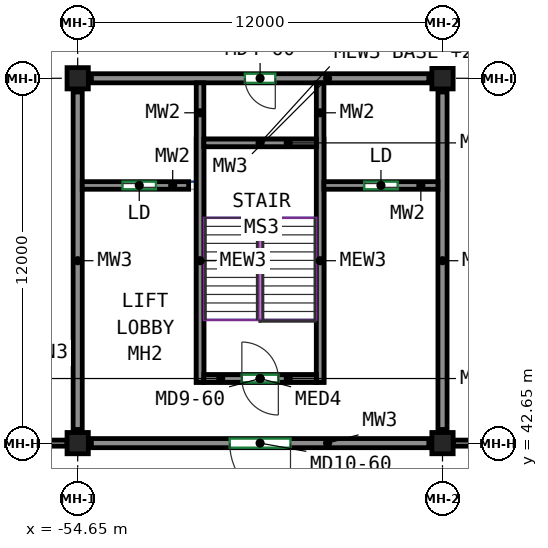
"""IFC4 building model, lengths in metres.
Left out: names, types, materials, properties, quantities, classifications, styles, units other than length and angle.
Written with IfcOpenShell. Run it as: python <this file> out.ifc"""

import sys

from ifc_helpers import new_model, si_unit, direction, frame, frame_2d, origin, origin_2d, place, context, subcontext, project, spatial, rectangle, extrude, source, transform, mapped, element, fill, save


model = new_model("IFC4")
c1 = context("Model", 3, precision=1e-05, world=origin(), true_north=direction((0.0, 1.0)))
c2 = subcontext(c1, "Body", "Model", "MODEL_VIEW")
j1 = project(units=[si_unit("LENGTHUNIT", "METRE"), si_unit("PLANEANGLEUNIT", "RADIAN")], contexts=[c1])
p1 = place(None, origin())
s1 = spatial("IfcSite", under=j1, at=p1, CompositionType="ELEMENT")
p2 = place(p1, origin())
s2 = spatial("IfcBuilding", under=s1, at=p2, CompositionType="ELEMENT")
p3 = place(p2, frame((0.0, 0.0, 22.5)))
s3 = spatial("IfcBuildingStorey", under=s2, at=p3, CompositionType="ELEMENT", Elevation=22.5)
m1 = source(origin(), c2, "Body", "SweptSolid", [
    extrude(rectangle(XDim=0.7, YDim=0.7, at=origin_2d()), origin(), (0.0, 0.0, 1.0), 4.22),
])
for number, where, z_axis, x_axis in (
    (1, (-54.65, 42.65, 0.0), (0.0, 0.0, 1.0), (1.0, 0.0, 0.0)),
    (2, (-54.65, 54.65, 0.0), (0.0, 0.0, 1.0), (1.0, 0.0, 0.0)),
    (3, (-42.65, 42.65, 0.0), (0.0, 0.0, 1.0), (1.0, 0.0, 0.0)),
    (4, (-42.65, 54.65, 0.0), (0.0, 0.0, 1.0), (1.0, 0.0, 0.0)),
):
    element("IfcColumn", number, at=place(p3, frame(where, z_axis=z_axis, x_axis=x_axis)), inside=s3, PredefinedType="COLUMN", context=c2, shape_type="MappedRepresentation", body=[
        mapped(m1, transform((0.0, 0.0, 0.0))),
    ])
m2 = source(origin(), c2, "Body", "SweptSolid", [
    extrude(rectangle(XDim=11.1, YDim=0.3, at=frame_2d((5.55, 0.0))), origin(), (0.0, 0.0, 1.0), 3.42),
])
p4 = place(p3, frame((-43.1, 54.65, 0.0), z_axis=(0.0, 0.0, 1.0), x_axis=(-1.0, 0.0, 0.0)))
e5 = element("IfcWall", 5, at=p4, inside=s3, PredefinedType="SHEAR", context=c2, shape_type="MappedRepresentation", body=[
    mapped(m2, transform((0.0, 0.0, 0.0))),
])
p5 = place(p4, frame((5.05, 0.0, 0.0)))
e6 = element("IfcOpeningElement", 6, at=p5, cuts=e5, PredefinedType="OPENING", context=c2, shape_type="SweptSolid", body=[
    extrude(rectangle(XDim=1.0, YDim=2.1, at=frame_2d((0.5, 1.05))), frame((0.0, 0.16, 0.0), z_axis=(0.0, -1.0, 0.0), x_axis=(1.0, 0.0, 0.0)), (0.0, 0.0, 1.0), 0.32),
])
p6 = place(p3, frame((-43.1, 42.65, 0.0), z_axis=(0.0, 0.0, 1.0), x_axis=(-1.0, 0.0, 0.0)))
e7 = element("IfcWall", 7, at=p6, inside=s3, PredefinedType="SHEAR", context=c2, shape_type="MappedRepresentation", body=[
    mapped(m2, transform((0.0, 0.0, 0.0))),
])
p7 = place(p6, frame((4.55, 0.0, 0.0)))
e8 = element("IfcOpeningElement", 8, at=p7, cuts=e7, PredefinedType="OPENING", context=c2, shape_type="SweptSolid", body=[
    extrude(rectangle(XDim=2.0, YDim=2.4, at=frame_2d((1.0, 1.2))), frame((0.0, 0.16, 0.0), z_axis=(0.0, -1.0, 0.0), x_axis=(1.0, 0.0, 0.0)), (0.0, 0.0, 1.0), 0.32),
])
for number, where, z_axis, x_axis in (
    (9, (-42.65, 54.2, 0.0), (0.0, 0.0, 1.0), (0.0, -1.0, 0.0)),
    (10, (-54.65, 54.2, 0.0), (0.0, 0.0, 1.0), (0.0, -1.0, 0.0)),
):
    element("IfcWall", number, at=place(p3, frame(where, z_axis=z_axis, x_axis=x_axis)), inside=s3, PredefinedType="SHEAR", context=c2, shape_type="MappedRepresentation", body=[
        mapped(m2, transform((0.0, 0.0, 0.0))),
    ])
m3 = source(origin(), c2, "Body", "SweptSolid", [
    extrude(rectangle(XDim=9.85, YDim=0.25, at=frame_2d((4.925, 0.0))), origin(), (0.0, 0.0, 1.0), 4.22),
])
for number, where, z_axis, x_axis in (
    (11, (-46.675, 54.5, 0.0), (0.0, 0.0, 1.0), (0.0, -1.0, 0.0)),
    (12, (-50.625, 54.5, 0.0), (0.0, 0.0, 1.0), (0.0, -1.0, 0.0)),
):
    element("IfcWall", number, at=place(p3, frame(where, z_axis=z_axis, x_axis=x_axis)), inside=s3, PredefinedType="SHEAR", context=c2, shape_type="MappedRepresentation", body=[
        mapped(m3, transform((0.0, 0.0, 0.0))),
    ])
m4 = source(origin(), c2, "Body", "SweptSolid", [
    extrude(rectangle(XDim=3.7, YDim=0.25, at=frame_2d((1.85, 0.0))), origin(), (0.0, 0.0, 1.0), 4.22),
])
p8 = place(p3, frame((-46.8, 52.525, 0.0), z_axis=(0.0, 0.0, 1.0), x_axis=(-1.0, 0.0, 0.0)))
e13 = element("IfcWall", 13, at=p8, inside=s3, PredefinedType="SHEAR", context=c2, shape_type="MappedRepresentation", body=[
    mapped(m4, transform((0.0, 0.0, 0.0))),
])
p9 = place(p3, frame((-46.8, 44.775, 0.0), z_axis=(0.0, 0.0, 1.0), x_axis=(-1.0, 0.0, 0.0)))
e14 = element("IfcWall", 14, at=p9, inside=s3, PredefinedType="SHEAR", context=c2, shape_type="MappedRepresentation", body=[
    mapped(m4, transform((0.0, 0.0, 0.0))),
])
p10 = place(p9, frame((1.25, 0.0, 0.0)))
e15 = element("IfcOpeningElement", 15, at=p10, cuts=e14, PredefinedType="OPENING", context=c2, shape_type="SweptSolid", body=[
    extrude(rectangle(XDim=1.2, YDim=2.1, at=frame_2d((0.6, 1.05))), frame((0.0, 0.135, 0.0), z_axis=(0.0, -1.0, 0.0), x_axis=(1.0, 0.0, 0.0)), (0.0, 0.0, 1.0), 0.27),
])
m5 = source(origin(), c2, "Body", "SweptSolid", [
    extrude(rectangle(XDim=3.75, YDim=0.25, at=frame_2d((1.875, 0.0))), origin(), (0.0, 0.0, 1.0), 4.22),
])
p11 = place(p3, frame((-42.8, 51.125, 0.0), z_axis=(0.0, 0.0, 1.0), x_axis=(-1.0, 0.0, 0.0)))
e16 = element("IfcWall", 16, at=p11, inside=s3, PredefinedType="SHEAR", context=c2, shape_type="MappedRepresentation", body=[
    mapped(m5, transform((0.0, 0.0, 0.0))),
])
p12 = place(p11, frame((1.325, 0.0, 0.0)))
e17 = element("IfcOpeningElement", 17, at=p12, cuts=e16, PredefinedType="OPENING", context=c2, shape_type="SweptSolid", body=[
    extrude(rectangle(XDim=1.1, YDim=2.1, at=frame_2d((0.55, 1.05))), frame((0.0, 0.135, 0.0), z_axis=(0.0, -1.0, 0.0), x_axis=(1.0, 0.0, 0.0)), (0.0, 0.0, 1.0), 0.27),
])
m6 = source(origin(), c2, "Body", "SweptSolid", [
    extrude(rectangle(XDim=3.5, YDim=0.25, at=frame_2d((1.75, 0.0))), origin(), (0.0, 0.0, 1.0), 4.22),
])
p13 = place(p3, frame((-51.0, 51.125, 0.0), z_axis=(0.0, 0.0, 1.0), x_axis=(-1.0, 0.0, 0.0)))
e18 = element("IfcWall", 18, at=p13, inside=s3, PredefinedType="SHEAR", context=c2, shape_type="MappedRepresentation", body=[
    mapped(m6, transform((0.0, 0.0, 0.0))),
])
p14 = place(p13, frame((1.075, 0.0, 0.0)))
e19 = element("IfcOpeningElement", 19, at=p14, cuts=e18, PredefinedType="OPENING", context=c2, shape_type="SweptSolid", body=[
    extrude(rectangle(XDim=1.1, YDim=2.1, at=frame_2d((0.55, 1.05))), frame((0.0, 0.135, 0.0), z_axis=(0.0, -1.0, 0.0), x_axis=(1.0, 0.0, 0.0)), (0.0, 0.0, 1.0), 0.27),
])
m7 = source(origin(), c2, "Body", "SweptSolid", [
    extrude(rectangle(XDim=8.0, YDim=0.25, at=frame_2d((4.0, 0.0))), origin(), (0.0, 0.0, 1.0), 3.0),
])
for number, where, z_axis, x_axis in (
    (20, (-50.625, 44.65, 4.5), (0.0, 0.0, 1.0), (0.0, 1.0, 0.0)),
    (21, (-46.675, 44.65, 4.5), (0.0, 0.0, 1.0), (0.0, 1.0, 0.0)),
):
    element("IfcWall", number, at=place(p3, frame(where, z_axis=z_axis, x_axis=x_axis)), inside=s3, PredefinedType="SOLIDWALL", context=c2, shape_type="MappedRepresentation", body=[
        mapped(m7, transform((0.0, 0.0, 0.0))),
    ])
m8 = source(origin(), c2, "Body", "SweptSolid", [
    extrude(rectangle(XDim=3.7, YDim=0.25, at=frame_2d((1.85, 0.0))), origin(), (0.0, 0.0, 1.0), 3.0),
])
p15 = place(p3, frame((-50.5, 44.775, 4.5), z_axis=(0.0, 0.0, 1.0), x_axis=(1.0, 0.0, 0.0)))
e22 = element("IfcWall", 22, at=p15, inside=s3, PredefinedType="SOLIDWALL", context=c2, shape_type="MappedRepresentation", body=[
    mapped(m8, transform((0.0, 0.0, 0.0))),
])
p16 = place(p15, frame((1.25, 0.0, 0.0)))
e23 = element("IfcOpeningElement", 23, at=p16, cuts=e22, PredefinedType="OPENING", context=c2, shape_type="SweptSolid", body=[
    extrude(rectangle(XDim=1.2, YDim=2.1, at=frame_2d((0.6, 1.05))), frame((0.0, 0.135, 0.0), z_axis=(0.0, -1.0, 0.0), x_axis=(1.0, 0.0, 0.0)), (0.0, 0.0, 1.0), 0.27),
])
p17 = place(p3, frame((-50.5, 52.525, 4.5), z_axis=(0.0, 0.0, 1.0), x_axis=(1.0, 0.0, 0.0)))
e24 = element("IfcWall", 24, at=p17, inside=s3, PredefinedType="SOLIDWALL", context=c2, shape_type="MappedRepresentation", body=[
    mapped(m8, transform((0.0, 0.0, 0.0))),
])
m9 = source(origin(), c2, "Body", "SweptSolid", [
    extrude(rectangle(XDim=1.85, YDim=0.2, at=frame_2d((0.925, 0.0))), origin(), (0.0, 0.0, 1.0), 4.22),
])
p18 = place(p3, frame((-56.85, 42.65, 0.0), z_axis=(0.0, 0.0, 1.0), x_axis=(1.0, 0.0, 0.0)))
e25 = element("IfcWall", 25, at=p18, inside=s3, PredefinedType="PARTITIONING", context=c2, shape_type="MappedRepresentation", body=[
    mapped(m9, transform((0.0, 0.0, 0.0))),
])
m10 = source(origin(), c2, "Body", "SweptSolid", [
    extrude(rectangle(XDim=11.3, YDim=0.2, at=frame_2d((5.65, 0.0))), origin(), (0.0, 0.0, 1.0), 3.42),
])
p19 = place(p3, frame((-42.3, 42.65, 0.0), z_axis=(0.0, 0.0, 1.0), x_axis=(1.0, 0.0, 0.0)))
e26 = element("IfcWall", 26, at=p19, inside=s3, PredefinedType="PARTITIONING", context=c2, shape_type="MappedRepresentation", body=[
    mapped(m10, transform((0.0, 0.0, 0.0))),
])
p20 = place(p19, frame((5.05, 0.0, 0.0)))
e27 = element("IfcOpeningElement", 27, at=p20, cuts=e26, PredefinedType="OPENING", context=c2, shape_type="SweptSolid", body=[
    extrude(rectangle(XDim=1.2, YDim=2.1, at=frame_2d((0.6, 1.05))), frame((0.0, 0.11, 0.0), z_axis=(0.0, -1.0, 0.0), x_axis=(1.0, 0.0, 0.0)), (0.0, 0.0, 1.0), 0.22),
])
p21 = place(p16, origin())
e28 = element("IfcDoor", 28, at=p21, inside=s3, OperationType="DOUBLE_DOOR_SINGLE_SWING", PredefinedType="DOOR", context=c2, shape_type="SweptSolid", body=[
    extrude(rectangle(XDim=1.2, YDim=2.1, at=frame_2d((0.6, 1.05))), frame((0.0, 0.025, 0.0), z_axis=(0.0, -1.0, 0.0), x_axis=(1.0, 0.0, 0.0)), (0.0, 0.0, 1.0), 0.05),
])
fill(e23, e28)
p22 = place(p10, origin())
e29 = element("IfcDoor", 29, at=p22, inside=s3, OperationType="DOUBLE_DOOR_SINGLE_SWING", PredefinedType="DOOR", context=c2, shape_type="SweptSolid", body=[
    extrude(rectangle(XDim=1.2, YDim=2.1, at=frame_2d((0.6, 1.05))), frame((0.0, 0.025, 0.0), z_axis=(0.0, -1.0, 0.0), x_axis=(1.0, 0.0, 0.0)), (0.0, 0.0, 1.0), 0.05),
])
fill(e15, e29)
p23 = place(p7, origin())
e30 = element("IfcDoor", 30, at=p23, inside=s3, OperationType="DOUBLE_DOOR_SINGLE_SWING", PredefinedType="DOOR", context=c2, shape_type="SweptSolid", body=[
    extrude(rectangle(XDim=2.0, YDim=2.4, at=frame_2d((1.0, 1.2))), frame((0.0, 0.025, 0.0), z_axis=(0.0, -1.0, 0.0), x_axis=(1.0, 0.0, 0.0)), (0.0, 0.0, 1.0), 0.05),
])
fill(e8, e30)
p24 = place(p12, origin())
e31 = element("IfcDoor", 31, at=p24, inside=s3, OperationType="SLIDING_TO_LEFT", PredefinedType="DOOR", context=c2, shape_type="SweptSolid", body=[
    extrude(rectangle(XDim=1.1, YDim=2.1, at=frame_2d((0.55, 1.05))), frame((0.0, 0.025, 0.0), z_axis=(0.0, -1.0, 0.0), x_axis=(1.0, 0.0, 0.0)), (0.0, 0.0, 1.0), 0.05),
])
fill(e17, e31)
p25 = place(p14, origin())
e32 = element("IfcDoor", 32, at=p25, inside=s3, OperationType="SLIDING_TO_LEFT", PredefinedType="DOOR", context=c2, shape_type="SweptSolid", body=[
    extrude(rectangle(XDim=1.1, YDim=2.1, at=frame_2d((0.55, 1.05))), frame((0.0, 0.025, 0.0), z_axis=(0.0, -1.0, 0.0), x_axis=(1.0, 0.0, 0.0)), (0.0, 0.0, 1.0), 0.05),
])
fill(e19, e32)
p26 = place(p5, origin())
e33 = element("IfcDoor", 33, at=p26, inside=s3, OperationType="SINGLE_SWING_LEFT", PredefinedType="DOOR", context=c2, shape_type="SweptSolid", body=[
    extrude(rectangle(XDim=1.0, YDim=2.1, at=frame_2d((0.5, 1.05))), frame((0.0, 0.025, 0.0), z_axis=(0.0, -1.0, 0.0), x_axis=(1.0, 0.0, 0.0)), (0.0, 0.0, 1.0), 0.05),
])
fill(e6, e33)
save(model, sys.argv[1])
